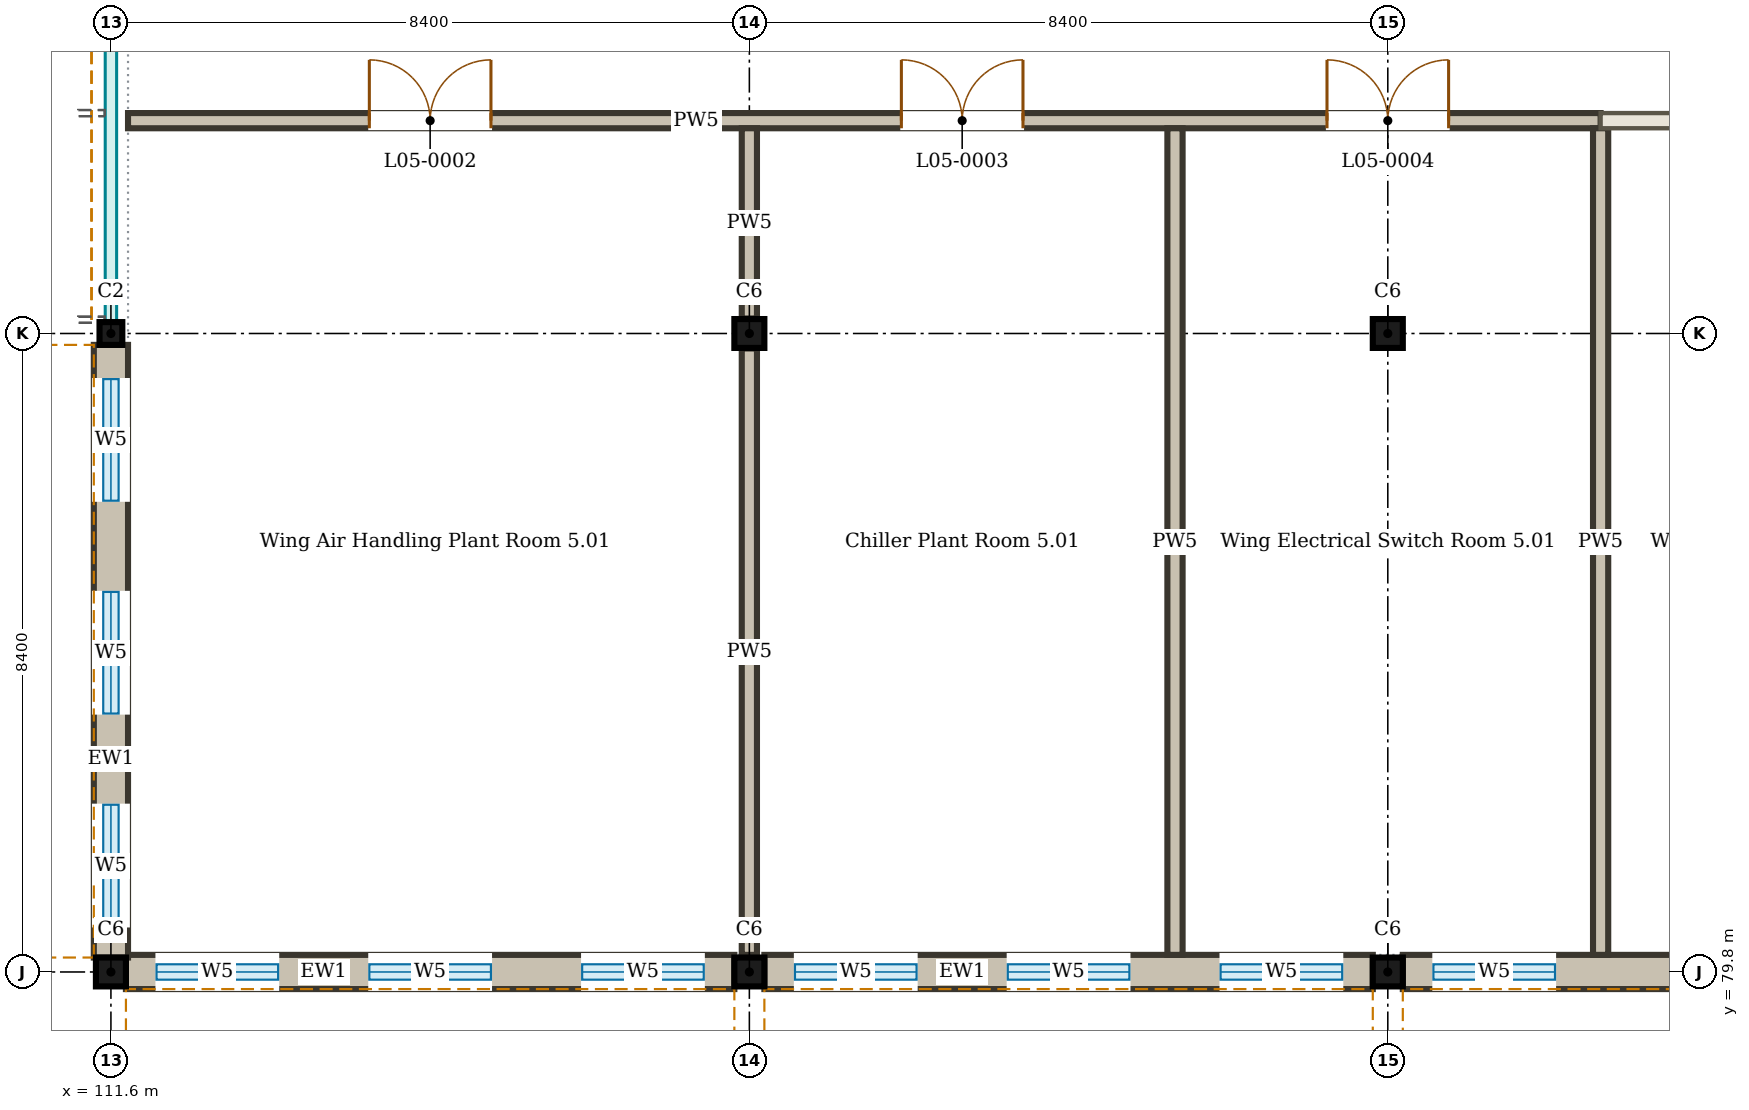
"""IFC4 building model, lengths in metres.
Left out: names, types, materials, properties, quantities, classifications, styles, units other than length and angle.
Written with IfcOpenShell. Run it as: python <this file> out.ifc"""

import sys

from ifc_helpers import new_model, si_unit, direction, frame, frame_2d, origin, origin_2d, place, context, subcontext, project, spatial, rectangle, i_section, extrude, element, fill, save


model = new_model("IFC4")
c1 = context("Model", 3, precision=1e-05, world=origin(), true_north=direction((0.0, 1.0)))
c2 = subcontext(c1, "Body", "Model", "MODEL_VIEW")
j1 = project(units=[si_unit("LENGTHUNIT", "METRE"), si_unit("PLANEANGLEUNIT", "RADIAN")], contexts=[c1])
p1 = place(None, origin())
s1 = spatial("IfcSite", under=j1, at=p1, CompositionType="ELEMENT")
p2 = place(p1, origin())
s2 = spatial("IfcBuilding", under=s1, at=p2, CompositionType="ELEMENT")
p3 = place(p2, frame((0.0, 0.0, 22.5)))
s3 = spatial("IfcBuildingStorey", under=s2, at=p3, CompositionType="ELEMENT", Elevation=22.5)
for number, where, z_axis, x_axis in (
    (1, (111.6, 79.8, 0.0), (0.0, 0.0, 1.0), (1.0, 0.0, 0.0)),
    (2, (120.0, 79.8, 0.0), (0.0, 0.0, 1.0), (1.0, 0.0, 0.0)),
    (3, (128.4, 79.8, 0.0), (0.0, 0.0, 1.0), (1.0, 0.0, 0.0)),
):
    element("IfcColumn", number, at=place(p3, frame(where, z_axis=z_axis, x_axis=x_axis)), inside=s3, PredefinedType="COLUMN", context=c2, shape_type="SweptSolid", body=[
        extrude(i_section(OverallWidth=0.395, OverallDepth=0.38, WebThickness=0.019, FlangeThickness=0.03, FilletRadius=0.027, at=origin_2d()), origin(), (0.0, 0.0, 1.0), 4.5),
    ])
p4 = place(p3, frame((111.6, 88.2, 0.0), z_axis=(0.0, 0.0, 1.0), x_axis=(1.0, 0.0, 0.0)))
e4 = element("IfcColumn", 4, at=p4, inside=s3, PredefinedType="COLUMN", context=c2, shape_type="SweptSolid", body=[
    extrude(i_section(OverallWidth=0.3, OverallDepth=0.3, WebThickness=0.011, FlangeThickness=0.019, FilletRadius=0.027, at=origin_2d()), origin(), (0.0, 0.0, 1.0), 4.5),
])
for number, where, z_axis, x_axis in (
    (5, (120.0, 88.2, 0.0), (0.0, 0.0, 1.0), (1.0, 0.0, 0.0)),
    (6, (128.4, 88.2, 0.0), (0.0, 0.0, 1.0), (1.0, 0.0, 0.0)),
):
    element("IfcColumn", number, at=place(p3, frame(where, z_axis=z_axis, x_axis=x_axis)), inside=s3, PredefinedType="COLUMN", context=c2, shape_type="SweptSolid", body=[
        extrude(i_section(OverallWidth=0.395, OverallDepth=0.38, WebThickness=0.019, FlangeThickness=0.03, FilletRadius=0.027, at=origin_2d()), origin(), (0.0, 0.0, 1.0), 4.5),
    ])
p5 = place(p3, frame((111.798, 79.8, 0.0), z_axis=(0.0, 0.0, 1.0), x_axis=(1.0, 0.0, 0.0)))
e7 = element("IfcWall", 7, at=p5, inside=s3, PredefinedType="SOLIDWALL", context=c2, shape_type="SweptSolid", body=[
    extrude(rectangle(XDim=8.005, YDim=0.45, at=frame_2d((4.002, 0.0))), origin(), (0.0, 0.0, 1.0), 3.85),
])
p6 = place(p5, frame((0.403, 0.0, 0.9)))
e8 = element("IfcOpeningElement", 8, at=p6, cuts=e7, PredefinedType="OPENING", context=c2, shape_type="SweptSolid", body=[
    extrude(rectangle(XDim=1.6, YDim=1.2, at=frame_2d((0.8, 0.6))), frame((0.0, 0.235, 0.0), z_axis=(0.0, -1.0, 0.0), x_axis=(1.0, 0.0, 0.0)), (0.0, 0.0, 1.0), 0.47),
])
p7 = place(p5, frame((3.202, 0.0, 0.9)))
e9 = element("IfcOpeningElement", 9, at=p7, cuts=e7, PredefinedType="OPENING", context=c2, shape_type="SweptSolid", body=[
    extrude(rectangle(XDim=1.6, YDim=1.2, at=frame_2d((0.8, 0.6))), frame((0.0, 0.235, 0.0), z_axis=(0.0, -1.0, 0.0), x_axis=(1.0, 0.0, 0.0)), (0.0, 0.0, 1.0), 0.47),
])
p8 = place(p5, frame((6.002, 0.0, 0.9)))
e10 = element("IfcOpeningElement", 10, at=p8, cuts=e7, PredefinedType="OPENING", context=c2, shape_type="SweptSolid", body=[
    extrude(rectangle(XDim=1.6, YDim=1.2, at=frame_2d((0.8, 0.6))), frame((0.0, 0.235, 0.0), z_axis=(0.0, -1.0, 0.0), x_axis=(1.0, 0.0, 0.0)), (0.0, 0.0, 1.0), 0.47),
])
p9 = place(p3, frame((120.198, 79.8, 0.0), z_axis=(0.0, 0.0, 1.0), x_axis=(1.0, 0.0, 0.0)))
e11 = element("IfcWall", 11, at=p9, inside=s3, PredefinedType="SOLIDWALL", context=c2, shape_type="SweptSolid", body=[
    extrude(rectangle(XDim=8.005, YDim=0.45, at=frame_2d((4.002, 0.0))), origin(), (0.0, 0.0, 1.0), 3.85),
])
p10 = place(p9, frame((0.403, 0.0, 0.9)))
e12 = element("IfcOpeningElement", 12, at=p10, cuts=e11, PredefinedType="OPENING", context=c2, shape_type="SweptSolid", body=[
    extrude(rectangle(XDim=1.6, YDim=1.2, at=frame_2d((0.8, 0.6))), frame((0.0, 0.235, 0.0), z_axis=(0.0, -1.0, 0.0), x_axis=(1.0, 0.0, 0.0)), (0.0, 0.0, 1.0), 0.47),
])
p11 = place(p9, frame((3.202, 0.0, 0.9)))
e13 = element("IfcOpeningElement", 13, at=p11, cuts=e11, PredefinedType="OPENING", context=c2, shape_type="SweptSolid", body=[
    extrude(rectangle(XDim=1.6, YDim=1.2, at=frame_2d((0.8, 0.6))), frame((0.0, 0.235, 0.0), z_axis=(0.0, -1.0, 0.0), x_axis=(1.0, 0.0, 0.0)), (0.0, 0.0, 1.0), 0.47),
])
p12 = place(p9, frame((6.002, 0.0, 0.9)))
e14 = element("IfcOpeningElement", 14, at=p12, cuts=e11, PredefinedType="OPENING", context=c2, shape_type="SweptSolid", body=[
    extrude(rectangle(XDim=1.6, YDim=1.2, at=frame_2d((0.8, 0.6))), frame((0.0, 0.235, 0.0), z_axis=(0.0, -1.0, 0.0), x_axis=(1.0, 0.0, 0.0)), (0.0, 0.0, 1.0), 0.47),
])
p13 = place(p3, frame((128.597, 79.8, 0.0), z_axis=(0.0, 0.0, 1.0), x_axis=(1.0, 0.0, 0.0)))
e15 = element("IfcWall", 15, at=p13, inside=s3, PredefinedType="SOLIDWALL", context=c2, shape_type="SweptSolid", body=[
    extrude(rectangle(XDim=8.203, YDim=0.45, at=frame_2d((4.101, 0.0))), origin(), (0.0, 0.0, 1.0), 3.85),
])
p14 = place(p13, frame((0.403, 0.0, 0.9)))
e16 = element("IfcOpeningElement", 16, at=p14, cuts=e15, PredefinedType="OPENING", context=c2, shape_type="SweptSolid", body=[
    extrude(rectangle(XDim=1.6, YDim=1.2, at=frame_2d((0.8, 0.6))), frame((0.0, 0.235, 0.0), z_axis=(0.0, -1.0, 0.0), x_axis=(1.0, 0.0, 0.0)), (0.0, 0.0, 1.0), 0.47),
])
p15 = place(p13, frame((3.702, 0.0, 2.1)))
e17 = element("IfcOpeningElement", 17, at=p15, cuts=e15, PredefinedType="OPENING", context=c2, shape_type="SweptSolid", body=[
    extrude(rectangle(XDim=0.6, YDim=1.2, at=frame_2d((0.3, 0.6))), frame((0.0, 0.235, 0.0), z_axis=(0.0, -1.0, 0.0), x_axis=(1.0, 0.0, 0.0)), (0.0, 0.0, 1.0), 0.47),
])
p16 = place(p13, frame((6.502, 0.0, 2.1)))
e18 = element("IfcOpeningElement", 18, at=p16, cuts=e15, PredefinedType="OPENING", context=c2, shape_type="SweptSolid", body=[
    extrude(rectangle(XDim=0.6, YDim=1.2, at=frame_2d((0.3, 0.6))), frame((0.0, 0.235, 0.0), z_axis=(0.0, -1.0, 0.0), x_axis=(1.0, 0.0, 0.0)), (0.0, 0.0, 1.0), 0.47),
])
p17 = place(p3, frame((111.6, 79.99, 0.0), z_axis=(0.0, 0.0, 1.0), x_axis=(0.0, 1.0, 0.0)))
e19 = element("IfcWall", 19, at=p17, inside=s3, PredefinedType="SOLIDWALL", context=c2, shape_type="SweptSolid", body=[
    extrude(rectangle(XDim=8.06, YDim=0.45, at=frame_2d((4.03, 0.0))), origin(), (0.0, 0.0, 1.0), 3.85),
])
p18 = place(p17, frame((0.41, 0.0, 0.9)))
e20 = element("IfcOpeningElement", 20, at=p18, cuts=e19, PredefinedType="OPENING", context=c2, shape_type="SweptSolid", body=[
    extrude(rectangle(XDim=1.6, YDim=1.2, at=frame_2d((0.8, 0.6))), frame((0.0, 0.235, 0.0), z_axis=(0.0, -1.0, 0.0), x_axis=(1.0, 0.0, 0.0)), (0.0, 0.0, 1.0), 0.47),
])
p19 = place(p17, frame((3.21, 0.0, 0.9)))
e21 = element("IfcOpeningElement", 21, at=p19, cuts=e19, PredefinedType="OPENING", context=c2, shape_type="SweptSolid", body=[
    extrude(rectangle(XDim=1.6, YDim=1.2, at=frame_2d((0.8, 0.6))), frame((0.0, 0.235, 0.0), z_axis=(0.0, -1.0, 0.0), x_axis=(1.0, 0.0, 0.0)), (0.0, 0.0, 1.0), 0.47),
])
p20 = place(p17, frame((6.01, 0.0, 0.9)))
e22 = element("IfcOpeningElement", 22, at=p20, cuts=e19, PredefinedType="OPENING", context=c2, shape_type="SweptSolid", body=[
    extrude(rectangle(XDim=1.6, YDim=1.2, at=frame_2d((0.8, 0.6))), frame((0.0, 0.235, 0.0), z_axis=(0.0, -1.0, 0.0), x_axis=(1.0, 0.0, 0.0)), (0.0, 0.0, 1.0), 0.47),
])
p21 = place(p3, frame((111.825, 91.0, 0.0), z_axis=(0.0, 0.0, 1.0), x_axis=(1.0, 0.0, 0.0)))
e23 = element("IfcWall", 23, at=p21, inside=s3, PredefinedType="SOLIDWALL", context=c2, shape_type="SweptSolid", body=[
    extrude(rectangle(XDim=19.375, YDim=0.2, at=frame_2d((9.688, 0.0))), origin(), (0.0, 0.0, 1.0), 3.844),
])
p22 = place(p21, frame((3.175, 0.0, 0.0)))
e24 = element("IfcOpeningElement", 24, at=p22, cuts=e23, PredefinedType="OPENING", context=c2, shape_type="SweptSolid", body=[
    extrude(rectangle(XDim=1.6, YDim=2.1, at=frame_2d((0.8, 1.05))), frame((0.0, 0.11, 0.0), z_axis=(0.0, -1.0, 0.0), x_axis=(1.0, 0.0, 0.0)), (0.0, 0.0, 1.0), 0.22),
])
p23 = place(p21, frame((10.175, 0.0, 0.0)))
e25 = element("IfcOpeningElement", 25, at=p23, cuts=e23, PredefinedType="OPENING", context=c2, shape_type="SweptSolid", body=[
    extrude(rectangle(XDim=1.6, YDim=2.1, at=frame_2d((0.8, 1.05))), frame((0.0, 0.11, 0.0), z_axis=(0.0, -1.0, 0.0), x_axis=(1.0, 0.0, 0.0)), (0.0, 0.0, 1.0), 0.22),
])
p24 = place(p21, frame((15.775, 0.0, 0.0)))
e26 = element("IfcOpeningElement", 26, at=p24, cuts=e23, PredefinedType="OPENING", context=c2, shape_type="SweptSolid", body=[
    extrude(rectangle(XDim=1.6, YDim=2.1, at=frame_2d((0.8, 1.05))), frame((0.0, 0.11, 0.0), z_axis=(0.0, -1.0, 0.0), x_axis=(1.0, 0.0, 0.0)), (0.0, 0.0, 1.0), 0.22),
])
p25 = place(p3, frame((131.2, 91.0, 0.0), z_axis=(0.0, 0.0, 1.0), x_axis=(1.0, 0.0, 0.0)))
e27 = element("IfcWall", 27, at=p25, inside=s3, PredefinedType="PARTITIONING", context=c2, shape_type="SweptSolid", body=[
    extrude(rectangle(XDim=2.9, YDim=0.2, at=frame_2d((1.45, 0.0))), origin(), (0.0, 0.0, 1.0), 3.936),
])
p26 = place(p3, frame((120.0, 80.025, 0.0), z_axis=(0.0, 0.0, 1.0), x_axis=(0.0, 1.0, 0.0)))
e28 = element("IfcWall", 28, at=p26, inside=s3, PredefinedType="SOLIDWALL", context=c2, shape_type="SweptSolid", body=[
    extrude(rectangle(XDim=7.978, YDim=0.2, at=frame_2d((3.989, 0.0))), origin(), (0.0, 0.0, 1.0), 3.844),
])
p27 = place(p3, frame((120.0, 88.397, 0.0), z_axis=(0.0, 0.0, 1.0), x_axis=(0.0, 1.0, 0.0)))
e29 = element("IfcWall", 29, at=p27, inside=s3, PredefinedType="SOLIDWALL", context=c2, shape_type="SweptSolid", body=[
    extrude(rectangle(XDim=2.502, YDim=0.2, at=frame_2d((1.251, 0.0))), origin(), (0.0, 0.0, 1.0), 3.844),
])
for number, where, z_axis, x_axis in (
    (30, (125.6, 80.025, 0.0), (0.0, 0.0, 1.0), (0.0, 1.0, 0.0)),
    (31, (131.2, 80.025, 0.0), (0.0, 0.0, 1.0), (0.0, 1.0, 0.0)),
):
    element("IfcWall", number, at=place(p3, frame(where, z_axis=z_axis, x_axis=x_axis)), inside=s3, PredefinedType="SOLIDWALL", context=c2, shape_type="SweptSolid", body=[
        extrude(rectangle(XDim=10.875, YDim=0.2, at=frame_2d((5.438, 0.0))), origin(), (0.0, 0.0, 1.0), 3.844),
    ])
p28 = place(p6, origin())
e32 = element("IfcWindow", 32, at=p28, inside=s3, PartitioningType="SINGLE_PANEL", PredefinedType="WINDOW", context=c2, shape_type="SweptSolid", body=[
    extrude(rectangle(XDim=1.6, YDim=1.2, at=frame_2d((0.8, 0.6))), frame((0.0, 0.03, 0.0), z_axis=(0.0, -1.0, 0.0), x_axis=(1.0, 0.0, 0.0)), (0.0, 0.0, 1.0), 0.06),
])
fill(e8, e32)
p29 = place(p7, origin())
e33 = element("IfcWindow", 33, at=p29, inside=s3, PartitioningType="SINGLE_PANEL", PredefinedType="WINDOW", context=c2, shape_type="SweptSolid", body=[
    extrude(rectangle(XDim=1.6, YDim=1.2, at=frame_2d((0.8, 0.6))), frame((0.0, 0.03, 0.0), z_axis=(0.0, -1.0, 0.0), x_axis=(1.0, 0.0, 0.0)), (0.0, 0.0, 1.0), 0.06),
])
fill(e9, e33)
p30 = place(p8, origin())
e34 = element("IfcWindow", 34, at=p30, inside=s3, PartitioningType="SINGLE_PANEL", PredefinedType="WINDOW", context=c2, shape_type="SweptSolid", body=[
    extrude(rectangle(XDim=1.6, YDim=1.2, at=frame_2d((0.8, 0.6))), frame((0.0, 0.03, 0.0), z_axis=(0.0, -1.0, 0.0), x_axis=(1.0, 0.0, 0.0)), (0.0, 0.0, 1.0), 0.06),
])
fill(e10, e34)
p31 = place(p10, origin())
e35 = element("IfcWindow", 35, at=p31, inside=s3, PartitioningType="SINGLE_PANEL", PredefinedType="WINDOW", context=c2, shape_type="SweptSolid", body=[
    extrude(rectangle(XDim=1.6, YDim=1.2, at=frame_2d((0.8, 0.6))), frame((0.0, 0.03, 0.0), z_axis=(0.0, -1.0, 0.0), x_axis=(1.0, 0.0, 0.0)), (0.0, 0.0, 1.0), 0.06),
])
fill(e12, e35)
p32 = place(p11, origin())
e36 = element("IfcWindow", 36, at=p32, inside=s3, PartitioningType="SINGLE_PANEL", PredefinedType="WINDOW", context=c2, shape_type="SweptSolid", body=[
    extrude(rectangle(XDim=1.6, YDim=1.2, at=frame_2d((0.8, 0.6))), frame((0.0, 0.03, 0.0), z_axis=(0.0, -1.0, 0.0), x_axis=(1.0, 0.0, 0.0)), (0.0, 0.0, 1.0), 0.06),
])
fill(e13, e36)
p33 = place(p12, origin())
e37 = element("IfcWindow", 37, at=p33, inside=s3, PartitioningType="SINGLE_PANEL", PredefinedType="WINDOW", context=c2, shape_type="SweptSolid", body=[
    extrude(rectangle(XDim=1.6, YDim=1.2, at=frame_2d((0.8, 0.6))), frame((0.0, 0.03, 0.0), z_axis=(0.0, -1.0, 0.0), x_axis=(1.0, 0.0, 0.0)), (0.0, 0.0, 1.0), 0.06),
])
fill(e14, e37)
p34 = place(p14, origin())
e38 = element("IfcWindow", 38, at=p34, inside=s3, PartitioningType="SINGLE_PANEL", PredefinedType="WINDOW", context=c2, shape_type="SweptSolid", body=[
    extrude(rectangle(XDim=1.6, YDim=1.2, at=frame_2d((0.8, 0.6))), frame((0.0, 0.03, 0.0), z_axis=(0.0, -1.0, 0.0), x_axis=(1.0, 0.0, 0.0)), (0.0, 0.0, 1.0), 0.06),
])
fill(e16, e38)
p35 = place(p18, origin())
e39 = element("IfcWindow", 39, at=p35, inside=s3, PartitioningType="SINGLE_PANEL", PredefinedType="WINDOW", context=c2, shape_type="SweptSolid", body=[
    extrude(rectangle(XDim=1.6, YDim=1.2, at=frame_2d((0.8, 0.6))), frame((0.0, 0.03, 0.0), z_axis=(0.0, -1.0, 0.0), x_axis=(1.0, 0.0, 0.0)), (0.0, 0.0, 1.0), 0.06),
])
fill(e20, e39)
p36 = place(p19, origin())
e40 = element("IfcWindow", 40, at=p36, inside=s3, PartitioningType="SINGLE_PANEL", PredefinedType="WINDOW", context=c2, shape_type="SweptSolid", body=[
    extrude(rectangle(XDim=1.6, YDim=1.2, at=frame_2d((0.8, 0.6))), frame((0.0, 0.03, 0.0), z_axis=(0.0, -1.0, 0.0), x_axis=(1.0, 0.0, 0.0)), (0.0, 0.0, 1.0), 0.06),
])
fill(e21, e40)
p37 = place(p20, origin())
e41 = element("IfcWindow", 41, at=p37, inside=s3, PartitioningType="SINGLE_PANEL", PredefinedType="WINDOW", context=c2, shape_type="SweptSolid", body=[
    extrude(rectangle(XDim=1.6, YDim=1.2, at=frame_2d((0.8, 0.6))), frame((0.0, 0.03, 0.0), z_axis=(0.0, -1.0, 0.0), x_axis=(1.0, 0.0, 0.0)), (0.0, 0.0, 1.0), 0.06),
])
fill(e22, e41)
p38 = place(p22, origin())
e42 = element("IfcDoor", 42, at=p38, inside=s3, OperationType="DOUBLE_DOOR_SINGLE_SWING", PredefinedType="DOOR", context=c2, shape_type="SweptSolid", body=[
    extrude(rectangle(XDim=1.6, YDim=2.1, at=frame_2d((0.8, 1.05))), frame((0.0, 0.025, 0.0), z_axis=(0.0, -1.0, 0.0), x_axis=(1.0, 0.0, 0.0)), (0.0, 0.0, 1.0), 0.05),
])
fill(e24, e42)
p39 = place(p23, origin())
e43 = element("IfcDoor", 43, at=p39, inside=s3, OperationType="DOUBLE_DOOR_SINGLE_SWING", PredefinedType="DOOR", context=c2, shape_type="SweptSolid", body=[
    extrude(rectangle(XDim=1.6, YDim=2.1, at=frame_2d((0.8, 1.05))), frame((0.0, 0.025, 0.0), z_axis=(0.0, -1.0, 0.0), x_axis=(1.0, 0.0, 0.0)), (0.0, 0.0, 1.0), 0.05),
])
fill(e25, e43)
p40 = place(p24, origin())
e44 = element("IfcDoor", 44, at=p40, inside=s3, OperationType="DOUBLE_DOOR_SINGLE_SWING", PredefinedType="DOOR", context=c2, shape_type="SweptSolid", body=[
    extrude(rectangle(XDim=1.6, YDim=2.1, at=frame_2d((0.8, 1.05))), frame((0.0, 0.025, 0.0), z_axis=(0.0, -1.0, 0.0), x_axis=(1.0, 0.0, 0.0)), (0.0, 0.0, 1.0), 0.05),
])
fill(e26, e44)
save(model, sys.argv[1])
